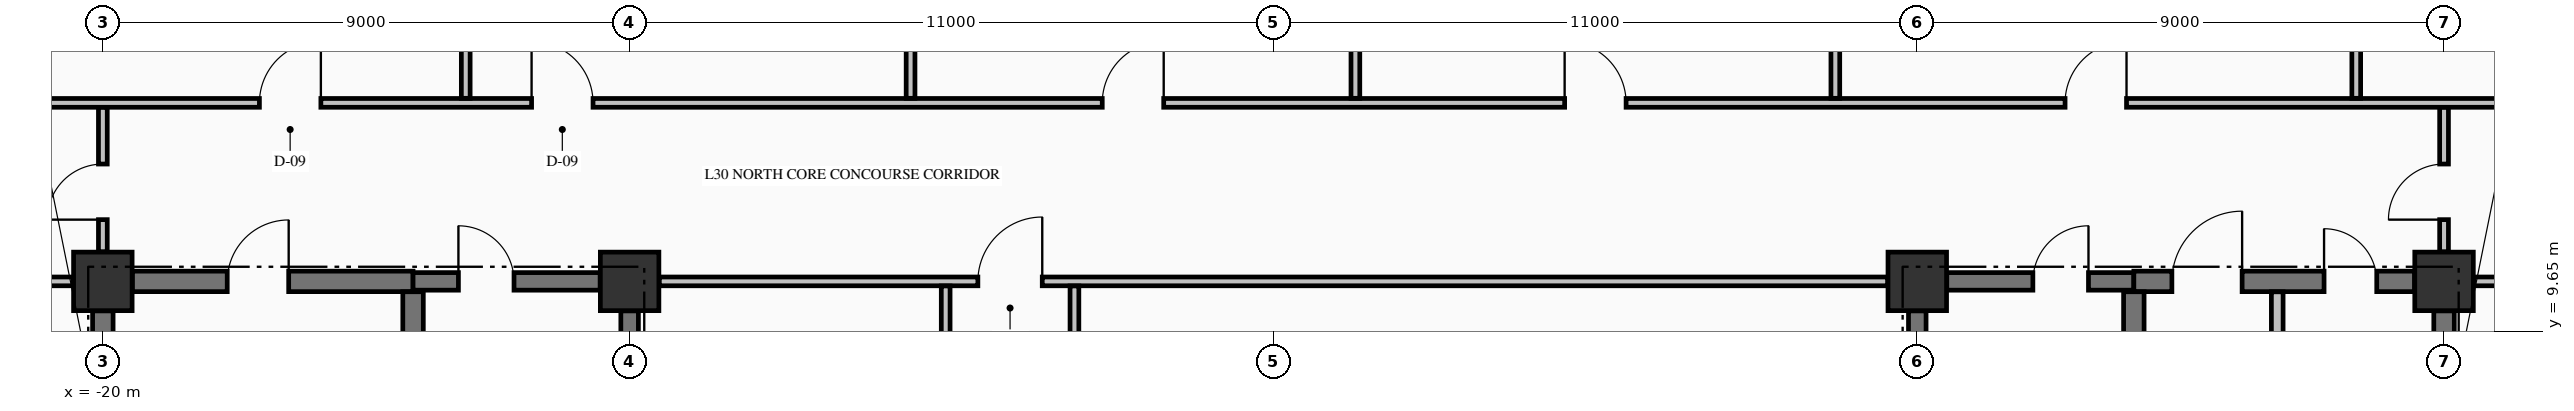
"""IFC4 building model, lengths in metres.
Left out: names, types, materials, properties, quantities, classifications, styles, units other than length and angle.
Written with IfcOpenShell. Run it as: python <this file> out.ifc"""

import sys

from ifc_helpers import new_model, si_unit, direction, frame, frame_2d, origin, origin_2d, place, context, subcontext, project, spatial, rectangle, extrude, element, fill, save


model = new_model("IFC4")
c1 = context("Model", 3, precision=1e-05, world=origin(), true_north=direction((0.0, 1.0)))
c2 = subcontext(c1, "Body", "Model", "MODEL_VIEW")
j1 = project(units=[si_unit("LENGTHUNIT", "METRE"), si_unit("PLANEANGLEUNIT", "RADIAN")], contexts=[c1])
p1 = place(None, origin())
s1 = spatial("IfcSite", under=j1, at=p1, CompositionType="ELEMENT")
p2 = place(p1, origin())
s2 = spatial("IfcBuilding", under=s1, at=p2, CompositionType="ELEMENT")
p3 = place(p2, frame((0.0, 0.0, 121.35)))
s3 = spatial("IfcBuildingStorey", under=s2, at=p3, CompositionType="ELEMENT", Elevation=121.35)
for number, where, z_axis, x_axis in (
    (1, (-20.0, 10.5, -0.425), (0.0, 0.0, 1.0), (1.0, 0.0, 0.0)),
    (2, (-11.0, 10.5, -0.425), (0.0, 0.0, 1.0), (1.0, 0.0, 0.0)),
    (3, (11.0, 10.5, -0.425), (0.0, 0.0, 1.0), (1.0, 0.0, 0.0)),
    (4, (20.0, 10.5, -0.425), (0.0, 0.0, 1.0), (1.0, 0.0, 0.0)),
):
    element("IfcColumn", number, at=place(p3, frame(where, z_axis=z_axis, x_axis=x_axis)), inside=s3, PredefinedType="COLUMN", context=c2, shape_type="SweptSolid", body=[
        extrude(rectangle(XDim=1.0, YDim=1.0, at=origin_2d()), origin(), (0.0, 0.0, 1.0), 3.745),
    ])
p4 = place(p3, frame((-19.496, 10.5, 0.0), z_axis=(0.0, 0.0, 1.0), x_axis=(1.0, 0.0, 0.0)))
e5 = element("IfcWall", 5, at=p4, inside=s3, PredefinedType="SHEAR", context=c2, shape_type="SweptSolid", body=[
    extrude(rectangle(XDim=4.796, YDim=0.35, at=frame_2d((2.398, 0.0))), origin(), (0.0, 0.0, 1.0), 3.32),
])
p5 = place(p4, frame((1.621, 0.0, 0.0)))
e6 = element("IfcOpeningElement", 6, at=p5, cuts=e5, PredefinedType="OPENING", context=c2, shape_type="SweptSolid", body=[
    extrude(rectangle(XDim=1.05, YDim=2.15, at=frame_2d((0.525, 1.075))), frame((0.0, 0.185, 0.0), z_axis=(0.0, -1.0, 0.0), x_axis=(1.0, 0.0, 0.0)), (0.0, 0.0, 1.0), 0.37),
])
p6 = place(p3, frame((-14.7, 10.5, 0.0), z_axis=(0.0, 0.0, 1.0), x_axis=(1.0, 0.0, 0.0)))
e7 = element("IfcWall", 7, at=p6, inside=s3, PredefinedType="SHEAR", context=c2, shape_type="SweptSolid", body=[
    extrude(rectangle(XDim=3.196, YDim=0.3, at=frame_2d((1.598, 0.0))), origin(), (0.0, 0.0, 1.0), 3.32),
])
p7 = place(p6, frame((0.775, 0.0, 0.0)))
e8 = element("IfcOpeningElement", 8, at=p7, cuts=e7, PredefinedType="OPENING", context=c2, shape_type="SweptSolid", body=[
    extrude(rectangle(XDim=0.95, YDim=2.15, at=frame_2d((0.475, 1.075))), frame((0.0, 0.16, 0.0), z_axis=(0.0, -1.0, 0.0), x_axis=(1.0, 0.0, 0.0)), (0.0, 0.0, 1.0), 0.32),
])
p8 = place(p3, frame((11.504, 10.5, 0.0), z_axis=(0.0, 0.0, 1.0), x_axis=(1.0, 0.0, 0.0)))
e9 = element("IfcWall", 9, at=p8, inside=s3, PredefinedType="SHEAR", context=c2, shape_type="SweptSolid", body=[
    extrude(rectangle(XDim=3.196, YDim=0.3, at=frame_2d((1.598, 0.0))), origin(), (0.0, 0.0, 1.0), 3.32),
])
p9 = place(p8, frame((1.471, 0.0, 0.0)))
e10 = element("IfcOpeningElement", 10, at=p9, cuts=e9, PredefinedType="OPENING", context=c2, shape_type="SweptSolid", body=[
    extrude(rectangle(XDim=0.95, YDim=2.15, at=frame_2d((0.475, 1.075))), frame((0.0, 0.16, 0.0), z_axis=(0.0, -1.0, 0.0), x_axis=(1.0, 0.0, 0.0)), (0.0, 0.0, 1.0), 0.32),
])
p10 = place(p3, frame((14.7, 10.5, 0.0), z_axis=(0.0, 0.0, 1.0), x_axis=(1.0, 0.0, 0.0)))
e11 = element("IfcWall", 11, at=p10, inside=s3, PredefinedType="SHEAR", context=c2, shape_type="SweptSolid", body=[
    extrude(rectangle(XDim=4.796, YDim=0.35, at=frame_2d((2.398, 0.0))), origin(), (0.0, 0.0, 1.0), 3.32),
])
p11 = place(p10, frame((0.65, 0.0, 0.0)))
e12 = element("IfcOpeningElement", 12, at=p11, cuts=e11, PredefinedType="OPENING", context=c2, shape_type="SweptSolid", body=[
    extrude(rectangle(XDim=1.2, YDim=2.15, at=frame_2d((0.6, 1.075))), frame((0.0, 0.185, 0.0), z_axis=(0.0, -1.0, 0.0), x_axis=(1.0, 0.0, 0.0)), (0.0, 0.0, 1.0), 0.37),
])
p12 = place(p10, frame((3.25, 0.0, 0.0)))
e13 = element("IfcOpeningElement", 13, at=p12, cuts=e11, PredefinedType="OPENING", context=c2, shape_type="SweptSolid", body=[
    extrude(rectangle(XDim=0.9, YDim=2.15, at=frame_2d((0.45, 1.075))), frame((0.0, 0.185, 0.0), z_axis=(0.0, -1.0, 0.0), x_axis=(1.0, 0.0, 0.0)), (0.0, 0.0, 1.0), 0.37),
])
p13 = place(p3, frame((-27.835, 10.5, 0.0), z_axis=(0.0, 0.0, 1.0), x_axis=(1.0, 0.0, 0.0)))
e14 = element("IfcWall", 14, at=p13, inside=s3, PredefinedType="PARTITIONING", context=c2, shape_type="SweptSolid", body=[
    extrude(rectangle(XDim=7.329, YDim=0.15, at=frame_2d((3.665, 0.0))), origin(), (0.0, 0.0, 1.0), 3.32),
])
p14 = place(p13, frame((3.36, 0.0, 0.0)))
e15 = element("IfcOpeningElement", 15, at=p14, cuts=e14, PredefinedType="OPENING", context=c2, shape_type="SweptSolid", body=[
    extrude(rectangle(XDim=0.95, YDim=2.15, at=frame_2d((0.475, 1.075))), frame((0.0, 0.085, 0.0), z_axis=(0.0, -1.0, 0.0), x_axis=(1.0, 0.0, 0.0)), (0.0, 0.0, 1.0), 0.17),
])
p15 = place(p3, frame((-10.494, 10.5, 0.0), z_axis=(0.0, 0.0, 1.0), x_axis=(1.0, 0.0, 0.0)))
e16 = element("IfcWall", 16, at=p15, inside=s3, PredefinedType="PARTITIONING", context=c2, shape_type="SweptSolid", body=[
    extrude(rectangle(XDim=20.988, YDim=0.15, at=frame_2d((10.494, 0.0))), origin(), (0.0, 0.0, 1.0), 3.32),
])
p16 = place(p15, frame((5.444, 0.0, 0.0)))
e17 = element("IfcOpeningElement", 17, at=p16, cuts=e16, PredefinedType="OPENING", context=c2, shape_type="SweptSolid", body=[
    extrude(rectangle(XDim=1.1, YDim=2.15, at=frame_2d((0.55, 1.075))), frame((0.0, 0.085, 0.0), z_axis=(0.0, -1.0, 0.0), x_axis=(1.0, 0.0, 0.0)), (0.0, 0.0, 1.0), 0.17),
])
p17 = place(p3, frame((20.506, 10.5, 0.0), z_axis=(0.0, 0.0, 1.0), x_axis=(1.0, 0.0, 0.0)))
e18 = element("IfcWall", 18, at=p17, inside=s3, PredefinedType="PARTITIONING", context=c2, shape_type="SweptSolid", body=[
    extrude(rectangle(XDim=2.329, YDim=0.15, at=frame_2d((1.165, 0.0))), origin(), (0.0, 0.0, 1.0), 3.32),
])
p18 = place(p17, frame((0.494, 0.0, 0.0)))
e19 = element("IfcOpeningElement", 19, at=p18, cuts=e18, PredefinedType="OPENING", context=c2, shape_type="SweptSolid", body=[
    extrude(rectangle(XDim=1.0, YDim=2.15, at=frame_2d((0.5, 1.075))), frame((0.0, 0.085, 0.0), z_axis=(0.0, -1.0, 0.0), x_axis=(1.0, 0.0, 0.0)), (0.0, 0.0, 1.0), 0.17),
])
p19 = place(p3, frame((-27.835, 13.55, 0.0), z_axis=(0.0, 0.0, 1.0), x_axis=(1.0, 0.0, 0.0)))
e20 = element("IfcWall", 20, at=p19, inside=s3, PredefinedType="PARTITIONING", context=c2, shape_type="SweptSolid", body=[
    extrude(rectangle(XDim=50.67, YDim=0.15, at=frame_2d((25.335, 0.0))), origin(), (0.0, 0.0, 1.0), 3.32),
])
p20 = place(p19, frame((10.51, 0.0, 0.0)))
e21 = element("IfcOpeningElement", 21, at=p20, cuts=e20, PredefinedType="OPENING", context=c2, shape_type="SweptSolid", body=[
    extrude(rectangle(XDim=1.05, YDim=2.15, at=frame_2d((0.525, 1.075))), frame((0.0, 0.085, 0.0), z_axis=(0.0, -1.0, 0.0), x_axis=(1.0, 0.0, 0.0)), (0.0, 0.0, 1.0), 0.17),
])
p21 = place(p19, frame((15.16, 0.0, 0.0)))
e22 = element("IfcOpeningElement", 22, at=p21, cuts=e20, PredefinedType="OPENING", context=c2, shape_type="SweptSolid", body=[
    extrude(rectangle(XDim=1.05, YDim=2.15, at=frame_2d((0.525, 1.075))), frame((0.0, 0.085, 0.0), z_axis=(0.0, -1.0, 0.0), x_axis=(1.0, 0.0, 0.0)), (0.0, 0.0, 1.0), 0.17),
])
p22 = place(p19, frame((24.91, 0.0, 0.0)))
e23 = element("IfcOpeningElement", 23, at=p22, cuts=e20, PredefinedType="OPENING", context=c2, shape_type="SweptSolid", body=[
    extrude(rectangle(XDim=1.05, YDim=2.15, at=frame_2d((0.525, 1.075))), frame((0.0, 0.085, 0.0), z_axis=(0.0, -1.0, 0.0), x_axis=(1.0, 0.0, 0.0)), (0.0, 0.0, 1.0), 0.17),
])
p23 = place(p19, frame((32.81, 0.0, 0.0)))
e24 = element("IfcOpeningElement", 24, at=p23, cuts=e20, PredefinedType="OPENING", context=c2, shape_type="SweptSolid", body=[
    extrude(rectangle(XDim=1.05, YDim=2.15, at=frame_2d((0.525, 1.075))), frame((0.0, 0.085, 0.0), z_axis=(0.0, -1.0, 0.0), x_axis=(1.0, 0.0, 0.0)), (0.0, 0.0, 1.0), 0.17),
])
p24 = place(p19, frame((41.36, 0.0, 0.0)))
e25 = element("IfcOpeningElement", 25, at=p24, cuts=e20, PredefinedType="OPENING", context=c2, shape_type="SweptSolid", body=[
    extrude(rectangle(XDim=1.05, YDim=2.15, at=frame_2d((0.525, 1.075))), frame((0.0, 0.085, 0.0), z_axis=(0.0, -1.0, 0.0), x_axis=(1.0, 0.0, 0.0)), (0.0, 0.0, 1.0), 0.17),
])
p25 = place(p3, frame((-20.0, 0.504, 0.0), z_axis=(0.0, 0.0, 1.0), x_axis=(0.0, 1.0, 0.0)))
e26 = element("IfcWall", 26, at=p25, inside=s3, PredefinedType="SHEAR", context=c2, shape_type="SweptSolid", body=[
    extrude(rectangle(XDim=9.492, YDim=0.35, at=frame_2d((4.746, 0.0))), origin(), (0.0, 0.0, 1.0), 3.32),
])
p26 = place(p3, frame((-14.7, 5.852, 0.0), z_axis=(0.0, 0.0, 1.0), x_axis=(0.0, 1.0, 0.0)))
e27 = element("IfcWall", 27, at=p26, inside=s3, PredefinedType="SHEAR", context=c2, shape_type="SweptSolid", body=[
    extrude(rectangle(XDim=4.471, YDim=0.35, at=frame_2d((2.235, 0.0))), origin(), (0.0, 0.0, 1.0), 3.32),
])
for number, where, z_axis, x_axis in (
    (28, (-11.0, 5.852, 0.0), (0.0, 0.0, 1.0), (0.0, 1.0, 0.0)),
    (29, (11.0, 5.852, 0.0), (0.0, 0.0, 1.0), (0.0, 1.0, 0.0)),
):
    element("IfcWall", number, at=place(p3, frame(where, z_axis=z_axis, x_axis=x_axis)), inside=s3, PredefinedType="SHEAR", context=c2, shape_type="SweptSolid", body=[
        extrude(rectangle(XDim=4.144, YDim=0.3, at=frame_2d((2.072, 0.0))), origin(), (0.0, 0.0, 1.0), 3.32),
    ])
p27 = place(p3, frame((14.7, 5.852, 0.0), z_axis=(0.0, 0.0, 1.0), x_axis=(0.0, 1.0, 0.0)))
e30 = element("IfcWall", 30, at=p27, inside=s3, PredefinedType="SHEAR", context=c2, shape_type="SweptSolid", body=[
    extrude(rectangle(XDim=4.471, YDim=0.35, at=frame_2d((2.235, 0.0))), origin(), (0.0, 0.0, 1.0), 3.32),
])
p28 = place(p3, frame((20.0, 5.377, 0.0), z_axis=(0.0, 0.0, 1.0), x_axis=(0.0, 1.0, 0.0)))
e31 = element("IfcWall", 31, at=p28, inside=s3, PredefinedType="SHEAR", context=c2, shape_type="SweptSolid", body=[
    extrude(rectangle(XDim=4.619, YDim=0.35, at=frame_2d((2.31, 0.0))), origin(), (0.0, 0.0, 1.0), 3.32),
])
p29 = place(p3, frame((-20.0, 11.006, 0.0), z_axis=(0.0, 0.0, 1.0), x_axis=(0.0, 1.0, 0.0)))
e32 = element("IfcWall", 32, at=p29, inside=s3, PredefinedType="PARTITIONING", context=c2, shape_type="SweptSolid", body=[
    extrude(rectangle(XDim=2.466, YDim=0.15, at=frame_2d((1.233, 0.0))), origin(), (0.0, 0.0, 1.0), 2.81),
])
p30 = place(p29, frame((0.549, 0.0, 0.0)))
e33 = element("IfcOpeningElement", 33, at=p30, cuts=e32, PredefinedType="OPENING", context=c2, shape_type="SweptSolid", body=[
    extrude(rectangle(XDim=0.95, YDim=2.15, at=frame_2d((0.475, 1.075))), frame((0.0, 0.085, 0.0), z_axis=(0.0, -1.0, 0.0), x_axis=(1.0, 0.0, 0.0)), (0.0, 0.0, 1.0), 0.17),
])
for number, where, z_axis, x_axis in (
    (34, (-13.8, 13.628, 0.0), (0.0, 0.0, 1.0), (0.0, 1.0, 0.0)),
    (35, (-6.2, 13.628, 0.0), (0.0, 0.0, 1.0), (0.0, 1.0, 0.0)),
):
    element("IfcWall", number, at=place(p3, frame(where, z_axis=z_axis, x_axis=x_axis)), inside=s3, PredefinedType="PARTITIONING", context=c2, shape_type="SweptSolid", body=[
        extrude(rectangle(XDim=11.707, YDim=0.15, at=frame_2d((5.854, 0.0))), origin(), (0.0, 0.0, 1.0), 3.32),
    ])
for number, where, z_axis, x_axis in (
    (36, (-5.6, 2.978, 0.0), (0.0, 0.0, 1.0), (0.0, 1.0, 0.0)),
    (37, (-3.4, 2.978, 0.0), (0.0, 0.0, 1.0), (0.0, 1.0, 0.0)),
):
    element("IfcWall", number, at=place(p3, frame(where, z_axis=z_axis, x_axis=x_axis)), inside=s3, PredefinedType="PARTITIONING", context=c2, shape_type="SweptSolid", body=[
        extrude(rectangle(XDim=7.444, YDim=0.15, at=frame_2d((3.722, 0.0))), origin(), (0.0, 0.0, 1.0), 3.32),
    ])
for number, where, z_axis, x_axis in (
    (38, (1.4, 13.628, 0.0), (0.0, 0.0, 1.0), (0.0, 1.0, 0.0)),
    (39, (9.6, 13.628, 0.0), (0.0, 0.0, 1.0), (0.0, 1.0, 0.0)),
):
    element("IfcWall", number, at=place(p3, frame(where, z_axis=z_axis, x_axis=x_axis)), inside=s3, PredefinedType="PARTITIONING", context=c2, shape_type="SweptSolid", body=[
        extrude(rectangle(XDim=11.707, YDim=0.15, at=frame_2d((5.854, 0.0))), origin(), (0.0, 0.0, 1.0), 3.32),
    ])
p31 = place(p3, frame((17.15, 5.378, 0.0), z_axis=(0.0, 0.0, 1.0), x_axis=(0.0, 1.0, 0.0)))
e40 = element("IfcWall", 40, at=p31, inside=s3, PredefinedType="PARTITIONING", context=c2, shape_type="SweptSolid", body=[
    extrude(rectangle(XDim=4.944, YDim=0.2, at=frame_2d((2.472, 0.0))), origin(), (0.0, 0.0, 1.0), 3.32),
])
p32 = place(p3, frame((18.5, 13.628, 0.0), z_axis=(0.0, 0.0, 1.0), x_axis=(0.0, 1.0, 0.0)))
e41 = element("IfcWall", 41, at=p32, inside=s3, PredefinedType="PARTITIONING", context=c2, shape_type="SweptSolid", body=[
    extrude(rectangle(XDim=6.766, YDim=0.15, at=frame_2d((3.383, 0.0))), origin(), (0.0, 0.0, 1.0), 3.32),
])
p33 = place(p3, frame((20.0, 11.006, 0.0), z_axis=(0.0, 0.0, 1.0), x_axis=(0.0, 1.0, 0.0)))
e42 = element("IfcWall", 42, at=p33, inside=s3, PredefinedType="PARTITIONING", context=c2, shape_type="SweptSolid", body=[
    extrude(rectangle(XDim=2.466, YDim=0.15, at=frame_2d((1.233, 0.0))), origin(), (0.0, 0.0, 1.0), 2.81),
])
p34 = place(p33, frame((0.549, 0.0, 0.0)))
e43 = element("IfcOpeningElement", 43, at=p34, cuts=e42, PredefinedType="OPENING", context=c2, shape_type="SweptSolid", body=[
    extrude(rectangle(XDim=0.95, YDim=2.15, at=frame_2d((0.475, 1.075))), frame((0.0, 0.085, 0.0), z_axis=(0.0, -1.0, 0.0), x_axis=(1.0, 0.0, 0.0)), (0.0, 0.0, 1.0), 0.17),
])
p35 = place(p7, origin())
e44 = element("IfcDoor", 44, at=p35, inside=s3, OperationType="SINGLE_SWING_LEFT", PredefinedType="DOOR", context=c2, shape_type="SweptSolid", body=[
    extrude(rectangle(XDim=0.95, YDim=2.15, at=frame_2d((0.475, 1.075))), frame((0.0, 0.025, 0.0), z_axis=(0.0, -1.0, 0.0), x_axis=(1.0, 0.0, 0.0)), (0.0, 0.0, 1.0), 0.05),
])
fill(e8, e44)
p36 = place(p9, origin())
e45 = element("IfcDoor", 45, at=p36, inside=s3, OperationType="SINGLE_SWING_RIGHT", PredefinedType="DOOR", context=c2, shape_type="SweptSolid", body=[
    extrude(rectangle(XDim=0.95, YDim=2.15, at=frame_2d((0.475, 1.075))), frame((0.0, 0.025, 0.0), z_axis=(0.0, -1.0, 0.0), x_axis=(1.0, 0.0, 0.0)), (0.0, 0.0, 1.0), 0.05),
])
fill(e10, e45)
p37 = place(p5, origin())
e46 = element("IfcDoor", 46, at=p37, inside=s3, OperationType="SINGLE_SWING_RIGHT", PredefinedType="DOOR", context=c2, shape_type="SweptSolid", body=[
    extrude(rectangle(XDim=1.05, YDim=2.15, at=frame_2d((0.525, 1.075))), frame((0.0, 0.025, 0.0), z_axis=(0.0, -1.0, 0.0), x_axis=(1.0, 0.0, 0.0)), (0.0, 0.0, 1.0), 0.05),
])
fill(e6, e46)
p38 = place(p11, origin())
e47 = element("IfcDoor", 47, at=p38, inside=s3, OperationType="SINGLE_SWING_RIGHT", PredefinedType="DOOR", context=c2, shape_type="SweptSolid", body=[
    extrude(rectangle(XDim=1.2, YDim=2.15, at=frame_2d((0.6, 1.075))), frame((0.0, 0.025, 0.0), z_axis=(0.0, -1.0, 0.0), x_axis=(1.0, 0.0, 0.0)), (0.0, 0.0, 1.0), 0.05),
])
fill(e12, e47)
p39 = place(p12, origin())
e48 = element("IfcDoor", 48, at=p39, inside=s3, OperationType="SINGLE_SWING_LEFT", PredefinedType="DOOR", context=c2, shape_type="SweptSolid", body=[
    extrude(rectangle(XDim=0.9, YDim=2.15, at=frame_2d((0.45, 1.075))), frame((0.0, 0.025, 0.0), z_axis=(0.0, -1.0, 0.0), x_axis=(1.0, 0.0, 0.0)), (0.0, 0.0, 1.0), 0.05),
])
fill(e13, e48)
p40 = place(p16, origin())
e49 = element("IfcDoor", 49, at=p40, inside=s3, OperationType="SINGLE_SWING_RIGHT", PredefinedType="DOOR", context=c2, shape_type="SweptSolid", body=[
    extrude(rectangle(XDim=1.1, YDim=2.15, at=frame_2d((0.55, 1.075))), frame((0.0, 0.025, 0.0), z_axis=(0.0, -1.0, 0.0), x_axis=(1.0, 0.0, 0.0)), (0.0, 0.0, 1.0), 0.05),
])
fill(e17, e49)
p41 = place(p20, origin())
e50 = element("IfcDoor", 50, at=p41, inside=s3, OperationType="SINGLE_SWING_RIGHT", PredefinedType="DOOR", context=c2, shape_type="SweptSolid", body=[
    extrude(rectangle(XDim=1.05, YDim=2.15, at=frame_2d((0.525, 1.075))), frame((0.0, 0.025, 0.0), z_axis=(0.0, -1.0, 0.0), x_axis=(1.0, 0.0, 0.0)), (0.0, 0.0, 1.0), 0.05),
])
fill(e21, e50)
p42 = place(p21, origin())
e51 = element("IfcDoor", 51, at=p42, inside=s3, OperationType="SINGLE_SWING_LEFT", PredefinedType="DOOR", context=c2, shape_type="SweptSolid", body=[
    extrude(rectangle(XDim=1.05, YDim=2.15, at=frame_2d((0.525, 1.075))), frame((0.0, 0.025, 0.0), z_axis=(0.0, -1.0, 0.0), x_axis=(1.0, 0.0, 0.0)), (0.0, 0.0, 1.0), 0.05),
])
fill(e22, e51)
p43 = place(p22, origin())
e52 = element("IfcDoor", 52, at=p43, inside=s3, OperationType="SINGLE_SWING_RIGHT", PredefinedType="DOOR", context=c2, shape_type="SweptSolid", body=[
    extrude(rectangle(XDim=1.05, YDim=2.15, at=frame_2d((0.525, 1.075))), frame((0.0, 0.025, 0.0), z_axis=(0.0, -1.0, 0.0), x_axis=(1.0, 0.0, 0.0)), (0.0, 0.0, 1.0), 0.05),
])
fill(e23, e52)
p44 = place(p23, origin())
e53 = element("IfcDoor", 53, at=p44, inside=s3, OperationType="SINGLE_SWING_LEFT", PredefinedType="DOOR", context=c2, shape_type="SweptSolid", body=[
    extrude(rectangle(XDim=1.05, YDim=2.15, at=frame_2d((0.525, 1.075))), frame((0.0, 0.025, 0.0), z_axis=(0.0, -1.0, 0.0), x_axis=(1.0, 0.0, 0.0)), (0.0, 0.0, 1.0), 0.05),
])
fill(e24, e53)
p45 = place(p24, origin())
e54 = element("IfcDoor", 54, at=p45, inside=s3, OperationType="SINGLE_SWING_RIGHT", PredefinedType="DOOR", context=c2, shape_type="SweptSolid", body=[
    extrude(rectangle(XDim=1.05, YDim=2.15, at=frame_2d((0.525, 1.075))), frame((0.0, 0.025, 0.0), z_axis=(0.0, -1.0, 0.0), x_axis=(1.0, 0.0, 0.0)), (0.0, 0.0, 1.0), 0.05),
])
fill(e25, e54)
p46 = place(p30, origin())
e55 = element("IfcDoor", 55, at=p46, inside=s3, OperationType="SINGLE_SWING_LEFT", PredefinedType="DOOR", context=c2, shape_type="SweptSolid", body=[
    extrude(rectangle(XDim=0.95, YDim=2.15, at=frame_2d((0.475, 1.075))), frame((0.0, 0.025, 0.0), z_axis=(0.0, -1.0, 0.0), x_axis=(1.0, 0.0, 0.0)), (0.0, 0.0, 1.0), 0.05),
])
fill(e33, e55)
p47 = place(p34, origin())
e56 = element("IfcDoor", 56, at=p47, inside=s3, OperationType="SINGLE_SWING_LEFT", PredefinedType="DOOR", context=c2, shape_type="SweptSolid", body=[
    extrude(rectangle(XDim=0.95, YDim=2.15, at=frame_2d((0.475, 1.075))), frame((0.0, 0.025, 0.0), z_axis=(0.0, -1.0, 0.0), x_axis=(1.0, 0.0, 0.0)), (0.0, 0.0, 1.0), 0.05),
])
fill(e43, e56)
save(model, sys.argv[1])
